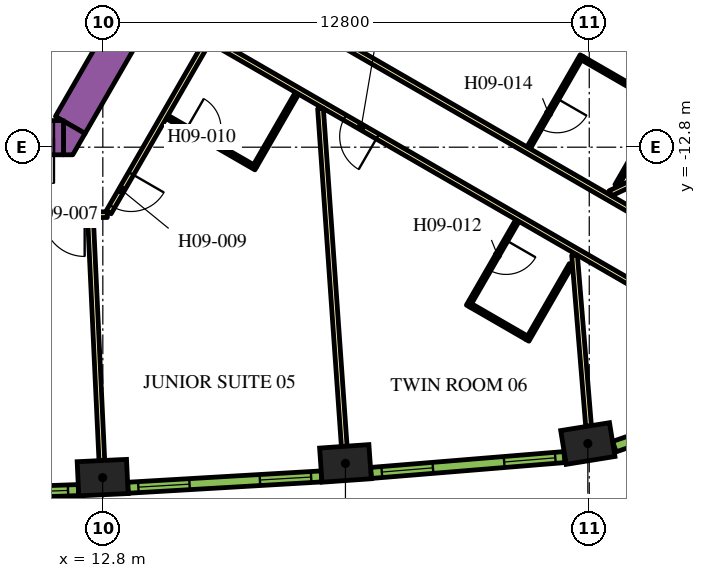
"""IFC4 building model, lengths in metres.
Left out: names, types, materials, properties, quantities, classifications, styles, units other than length and angle.
Written with IfcOpenShell. Run it as: python <this file> out.ifc"""

import sys

from ifc_helpers import new_model, si_unit, direction, frame, frame_2d, origin, origin_2d, place, context, subcontext, project, spatial, polyline, rectangle, outline, extrude, element, fill, save


model = new_model("IFC4")
c1 = context("Model", 3, precision=1e-05, world=origin(), true_north=direction((0.0, 1.0)))
c2 = subcontext(c1, "Body", "Model", "MODEL_VIEW")
j1 = project(units=[si_unit("LENGTHUNIT", "METRE"), si_unit("PLANEANGLEUNIT", "RADIAN")], contexts=[c1])
p1 = place(None, origin())
s1 = spatial("IfcSite", under=j1, at=p1, CompositionType="ELEMENT")
p2 = place(p1, origin())
s2 = spatial("IfcBuilding", under=s1, at=p2, CompositionType="ELEMENT")
p3 = place(p2, frame((0.0, 0.0, 122.7)))
s3 = spatial("IfcBuildingStorey", under=s2, at=p3, CompositionType="ELEMENT", Elevation=122.7)
for number, where, z_axis, x_axis in (
    (1, (12.795, -21.494, 0.0), (0.0, 0.0, 1.0), (0.999, 0.047, 0.0)),
    (2, (19.184, -21.12, 0.0), (0.0, 0.0, 1.0), (0.998, 0.07, 0.0)),
    (3, (25.563, -20.597, 0.0), (0.0, 0.0, 1.0), (0.987, 0.159, 0.0)),
):
    element("IfcColumn", number, at=place(p3, frame(where, z_axis=z_axis, x_axis=x_axis)), inside=s3, PredefinedType="COLUMN", context=c2, shape_type="SweptSolid", body=[
        extrude(rectangle(XDim=1.3, YDim=0.9, at=origin_2d()), origin(), (0.0, 0.0, 1.0), 3.9),
    ])
p4 = place(p3, frame((11.943, -12.214, 0.0), z_axis=(0.0, 0.0, 1.0), x_axis=(0.49998092645, 0.866036415623, 0.0)))
e4 = element("IfcWall", 4, at=p4, inside=s3, PredefinedType="SOLIDWALL", context=c2, shape_type="SweptSolid", body=[
    extrude(rectangle(XDim=8.83, YDim=0.9, at=frame_2d((4.415, 0.0))), origin(), (0.0, 0.0, 1.0), 3.9),
])
p5 = place(p3, origin())
e5 = element("IfcWall", 5, at=p5, inside=s3, PredefinedType="SOLIDWALL", context=c2, shape_type="SweptSolid", body=[
    extrude(outline(polyline([(12.009, -13.0), (11.764, -13.0), (11.764, -12.113), (12.332, -12.441), (12.009, -13.0)])), origin(), (0.0, 0.0, 1.0), 3.9),
])
p6 = place(p3, frame((11.764, -12.55, 0.0), z_axis=(0.0, 0.0, 1.0), x_axis=(-1.0, 0.0, 0.0)))
e6 = element("IfcWall", 6, at=p6, inside=s3, PredefinedType="SOLIDWALL", context=c2, shape_type="SweptSolid", body=[
    extrude(rectangle(XDim=1.7, YDim=0.9, at=frame_2d((0.85, 0.0))), origin(), (0.0, 0.0, 1.0), 3.9),
])
p7 = place(p6, frame((0.25, 0.0, 0.0)))
e7 = element("IfcOpeningElement", 7, at=p7, cuts=e6, PredefinedType="OPENING", context=c2, shape_type="SweptSolid", body=[
    extrude(rectangle(XDim=1.2, YDim=2.1, at=frame_2d((0.6, 1.05))), frame((0.0, 0.46, 0.0), z_axis=(0.0, -1.0, 0.0), x_axis=(1.0, 0.0, 0.0)), (0.0, 0.0, 1.0), 0.92),
])
p8 = place(p3, frame((16.412, -8.523, 0.0), z_axis=(0.0, 0.0, 1.0), x_axis=(0.866025629663, -0.499999608766, 0.0)))
e8 = element("IfcWall", 8, at=p8, inside=s3, PredefinedType="PARTITIONING", context=c2, shape_type="SweptSolid", body=[
    extrude(rectangle(XDim=13.624, YDim=0.15, at=frame_2d((6.812, 0.0))), origin(), (0.0, 0.0, 1.0), 2.75),
])
p9 = place(p8, frame((0.426, 0.0, 0.0)))
e9 = element("IfcOpeningElement", 9, at=p9, cuts=e8, PredefinedType="OPENING", context=c2, shape_type="SweptSolid", body=[
    extrude(rectangle(XDim=1.0, YDim=2.1, at=frame_2d((0.5, 1.05))), frame((0.0, 0.085, 0.0), z_axis=(0.0, -1.0, 0.0), x_axis=(1.0, 0.0, 0.0)), (0.0, 0.0, 1.0), 0.17),
])
p10 = place(p3, frame((12.918, -14.575, 0.0), z_axis=(0.0, 0.0, 1.0), x_axis=(-1.0, 0.0, 0.0)))
e10 = element("IfcWall", 10, at=p10, inside=s3, PredefinedType="PARTITIONING", context=c2, shape_type="SweptSolid", body=[
    extrude(rectangle(XDim=25.766, YDim=0.15, at=frame_2d((12.883, 0.0))), origin(), (0.0, 0.0, 1.0), 2.75),
])
p11 = place(p10, frame((16.189, 0.0, 0.0)))
e11 = element("IfcOpeningElement", 11, at=p11, cuts=e10, PredefinedType="OPENING", context=c2, shape_type="SweptSolid", body=[
    extrude(rectangle(XDim=1.0, YDim=2.1, at=frame_2d((0.5, 1.05))), frame((0.0, 0.085, 0.0), z_axis=(0.0, -1.0, 0.0), x_axis=(1.0, 0.0, 0.0)), (0.0, 0.0, 1.0), 0.17),
])
p12 = place(p10, frame((14.882, 0.0, 0.0)))
e12 = element("IfcOpeningElement", 12, at=p12, cuts=e10, PredefinedType="OPENING", context=c2, shape_type="SweptSolid", body=[
    extrude(rectangle(XDim=1.0, YDim=2.1, at=frame_2d((0.5, 1.05))), frame((0.0, 0.085, 0.0), z_axis=(0.0, -1.0, 0.0), x_axis=(1.0, 0.0, 0.0)), (0.0, 0.0, 1.0), 0.17),
])
p13 = place(p10, frame((0.596, 0.0, 0.0)))
e13 = element("IfcOpeningElement", 13, at=p13, cuts=e10, PredefinedType="OPENING", context=c2, shape_type="SweptSolid", body=[
    extrude(rectangle(XDim=1.1, YDim=2.1, at=frame_2d((0.55, 1.05))), frame((0.0, 0.085, 0.0), z_axis=(0.0, -1.0, 0.0), x_axis=(1.0, 0.0, 0.0)), (0.0, 0.0, 1.0), 0.17),
])
p14 = place(p3, frame((15.587, -9.952, 0.0), z_axis=(0.0, 0.0, 1.0), x_axis=(-0.500016618951, -0.866015808616, 0.0)))
e14 = element("IfcWall", 14, at=p14, inside=s3, PredefinedType="PARTITIONING", context=c2, shape_type="SweptSolid", body=[
    extrude(rectangle(XDim=5.268, YDim=0.15, at=frame_2d((2.634, 0.0))), origin(), (0.0, 0.0, 1.0), 2.75),
])
p15 = place(p14, frame((4.088, 0.0, 0.0)))
e15 = element("IfcOpeningElement", 15, at=p15, cuts=e14, PredefinedType="OPENING", context=c2, shape_type="SweptSolid", body=[
    extrude(rectangle(XDim=1.0, YDim=2.1, at=frame_2d((0.5, 1.05))), frame((0.0, 0.085, 0.0), z_axis=(0.0, -1.0, 0.0), x_axis=(1.0, 0.0, 0.0)), (0.0, 0.0, 1.0), 0.17),
])
p16 = place(p3, frame((27.386, -16.764, 0.0), z_axis=(0.0, 0.0, 1.0), x_axis=(-0.866022585856, 0.500004880763, 0.0)))
e16 = element("IfcWall", 16, at=p16, inside=s3, PredefinedType="PARTITIONING", context=c2, shape_type="SweptSolid", body=[
    extrude(rectangle(XDim=13.544, YDim=0.15, at=frame_2d((6.772, 0.0))), origin(), (0.0, 0.0, 1.0), 2.75),
])
p17 = place(p16, frame((8.491, 0.0, 0.0)))
e17 = element("IfcOpeningElement", 17, at=p17, cuts=e16, PredefinedType="OPENING", context=c2, shape_type="SweptSolid", body=[
    extrude(rectangle(XDim=1.0, YDim=2.1, at=frame_2d((0.5, 1.05))), frame((0.0, 0.085, 0.0), z_axis=(0.0, -1.0, 0.0), x_axis=(1.0, 0.0, 0.0)), (0.0, 0.0, 1.0), 0.17),
])
p18 = place(p3, frame((12.774, -21.045, 0.0), z_axis=(0.0, 0.0, 1.0), x_axis=(-0.046750341626, 0.998906605023, 0.0)))
e18 = element("IfcWall", 18, at=p18, inside=s3, PredefinedType="PARTITIONING", context=c2, shape_type="SweptSolid", body=[
    extrude(rectangle(XDim=6.392, YDim=0.15, at=frame_2d((3.196, 0.0))), origin(), (0.0, 0.0, 1.0), 2.75),
])
p19 = place(p3, frame((19.153, -20.671, 0.0), z_axis=(0.0, 0.0, 1.0), x_axis=(-0.070070736723, 0.997542025107, 0.0)))
e19 = element("IfcWall", 19, at=p19, inside=s3, PredefinedType="PARTITIONING", context=c2, shape_type="SweptSolid", body=[
    extrude(rectangle(XDim=8.909, YDim=0.15, at=frame_2d((4.455, 0.0))), origin(), (0.0, 0.0, 1.0), 2.75),
])
p20 = place(p3, frame((25.582, -20.138, 0.0), z_axis=(0.0, 0.0, 1.0), x_axis=(-0.081746132986, 0.996653184283, 0.0)))
e20 = element("IfcWall", 20, at=p20, inside=s3, PredefinedType="PARTITIONING", context=c2, shape_type="SweptSolid", body=[
    extrude(rectangle(XDim=4.51, YDim=0.15, at=frame_2d((2.255, 0.0))), origin(), (0.0, 0.0, 1.0), 2.75),
])
p21 = place(p3, frame((30.231, -12.085, 0.0), z_axis=(0.0, 0.0, 1.0), x_axis=(-0.904001132572, -0.427530060122, 0.0)))
e21 = element("IfcWall", 21, at=p21, inside=s3, PredefinedType="PARTITIONING", context=c2, shape_type="SweptSolid", body=[
    extrude(rectangle(XDim=4.51, YDim=0.15, at=frame_2d((2.255, 0.0))), origin(), (0.0, 0.0, 1.0), 2.75),
])
p22 = place(p3, frame((14.49, -12.003, 0.0), z_axis=(0.0, 0.0, 1.0), x_axis=(0.866059108428, -0.4999416173, 0.0)))
e22 = element("IfcWall", 22, at=p22, inside=s3, PredefinedType="PARTITIONING", context=c2, shape_type="SweptSolid", body=[
    extrude(rectangle(XDim=2.7, YDim=0.1, at=frame_2d((1.35, 0.0))), origin(), (0.0, 0.0, 1.0), 2.75),
])
p23 = place(p22, frame((0.6, 0.0, 0.0)))
e23 = element("IfcOpeningElement", 23, at=p23, cuts=e22, PredefinedType="OPENING", context=c2, shape_type="SweptSolid", body=[
    extrude(rectangle(XDim=0.9, YDim=2.1, at=frame_2d((0.45, 1.05))), frame((0.0, 0.06, 0.0), z_axis=(0.0, -1.0, 0.0), x_axis=(1.0, 0.0, 0.0)), (0.0, 0.0, 1.0), 0.12),
])
p24 = place(p3, frame((16.81, -13.285, 0.0), z_axis=(0.0, 0.0, 1.0), x_axis=(0.499994660107, 0.866028486751, 0.0)))
e24 = element("IfcWall", 24, at=p24, inside=s3, PredefinedType="PARTITIONING", context=c2, shape_type="SweptSolid", body=[
    extrude(rectangle(XDim=2.2, YDim=0.1, at=frame_2d((1.1, 0.0))), origin(), (0.0, 0.0, 1.0), 2.75),
])
p25 = place(p3, frame((23.71, -14.728, 0.0), z_axis=(0.0, 0.0, 1.0), x_axis=(-0.500006934395, -0.866021400173, 0.0)))
e25 = element("IfcWall", 25, at=p25, inside=s3, PredefinedType="PARTITIONING", context=c2, shape_type="SweptSolid", body=[
    extrude(rectangle(XDim=2.6, YDim=0.1, at=frame_2d((1.3, 0.0))), origin(), (0.0, 0.0, 1.0), 2.75),
])
p26 = place(p25, frame((0.6, 0.0, 0.0)))
e26 = element("IfcOpeningElement", 26, at=p26, cuts=e25, PredefinedType="OPENING", context=c2, shape_type="SweptSolid", body=[
    extrude(rectangle(XDim=0.9, YDim=2.1, at=frame_2d((0.45, 1.05))), frame((0.0, 0.06, 0.0), z_axis=(0.0, -1.0, 0.0), x_axis=(1.0, 0.0, 0.0)), (0.0, 0.0, 1.0), 0.12),
])
p27 = place(p3, frame((22.479, -16.962, 0.0), z_axis=(0.0, 0.0, 1.0), x_axis=(0.86605165483, -0.499954529098, 0.0)))
e27 = element("IfcWall", 27, at=p27, inside=s3, PredefinedType="PARTITIONING", context=c2, shape_type="SweptSolid", body=[
    extrude(rectangle(XDim=1.7, YDim=0.1, at=frame_2d((0.85, 0.0))), origin(), (0.0, 0.0, 1.0), 2.75),
])
p28 = place(p3, frame((25.119, -15.888, 0.0), z_axis=(0.0, 0.0, 1.0), x_axis=(-0.499998129301, -0.86602648383, 0.0)))
e28 = element("IfcWall", 28, at=p28, inside=s3, PredefinedType="PARTITIONING", context=c2, shape_type="SweptSolid", body=[
    extrude(rectangle(XDim=2.3, YDim=0.1, at=frame_2d((1.15, 0.0))), origin(), (0.0, 0.0, 1.0), 2.75),
])
p29 = place(p3, frame((25.404, -10.395, 0.0), z_axis=(0.0, 0.0, 1.0), x_axis=(-0.49998411664, -0.866034573852, 0.0)))
e29 = element("IfcWall", 29, at=p29, inside=s3, PredefinedType="PARTITIONING", context=c2, shape_type="SweptSolid", body=[
    extrude(rectangle(XDim=2.8, YDim=0.1, at=frame_2d((1.4, 0.0))), origin(), (0.0, 0.0, 1.0), 2.75),
])
p30 = place(p29, frame((1.3, 0.0, 0.0)))
e30 = element("IfcOpeningElement", 30, at=p30, cuts=e29, PredefinedType="OPENING", context=c2, shape_type="SweptSolid", body=[
    extrude(rectangle(XDim=0.9, YDim=2.1, at=frame_2d((0.45, 1.05))), frame((0.0, 0.06, 0.0), z_axis=(0.0, -1.0, 0.0), x_axis=(1.0, 0.0, 0.0)), (0.0, 0.0, 1.0), 0.12),
])
p31 = place(p3, frame((25.422, -10.463, 0.0), z_axis=(0.0, 0.0, 1.0), x_axis=(0.866024647952, -0.500001309137, 0.0)))
e31 = element("IfcWall", 31, at=p31, inside=s3, PredefinedType="PARTITIONING", context=c2, shape_type="SweptSolid", body=[
    extrude(rectangle(XDim=2.4, YDim=0.1, at=frame_2d((1.2, 0.0))), origin(), (0.0, 0.0, 1.0), 2.75),
])
p32 = place(p3, frame((26.319, -13.81, 0.0), z_axis=(0.0, 0.0, 1.0), x_axis=(0.500004234368, 0.866022959057, 0.0)))
e32 = element("IfcWall", 32, at=p32, inside=s3, PredefinedType="PARTITIONING", context=c2, shape_type="SweptSolid", body=[
    extrude(rectangle(XDim=2.5, YDim=0.1, at=frame_2d((1.25, 0.0))), origin(), (0.0, 0.0, 1.0), 2.75),
])
p33 = place(p3, frame((7.059, -22.001, 0.0), z_axis=(0.0, 0.0, 1.0), x_axis=(0.999385993957, 0.035037623812, 0.0)))
e33 = element("IfcWall", 33, at=p33, inside=s3, PredefinedType="SOLIDWALL", context=c2, shape_type="SweptSolid", body=[
    extrude(rectangle(XDim=5.101, YDim=0.29, at=frame_2d((2.55, 0.0))), origin(), (0.0, 0.0, 1.0), 3.65),
])
p34 = place(p33, frame((0.273, 0.0, 0.9)))
e34 = element("IfcOpeningElement", 34, at=p34, cuts=e33, PredefinedType="OPENING", context=c2, shape_type="SweptSolid", body=[
    extrude(rectangle(XDim=1.35, YDim=2.15, at=frame_2d((0.675, 1.075))), frame((0.0, 0.155, 0.0), z_axis=(0.0, -1.0, 0.0), x_axis=(1.0, 0.0, 0.0)), (0.0, 0.0, 1.0), 0.31),
])
p35 = place(p33, frame((3.478, 0.0, 0.9)))
e35 = element("IfcOpeningElement", 35, at=p35, cuts=e33, PredefinedType="OPENING", context=c2, shape_type="SweptSolid", body=[
    extrude(rectangle(XDim=1.35, YDim=2.15, at=frame_2d((0.675, 1.075))), frame((0.0, 0.155, 0.0), z_axis=(0.0, -1.0, 0.0), x_axis=(1.0, 0.0, 0.0)), (0.0, 0.0, 1.0), 0.31),
])
p36 = place(p3, frame((13.462, -21.761, 0.0), z_axis=(0.0, 0.0, 1.0), x_axis=(0.998290511436, 0.058447025388, 0.0)))
e36 = element("IfcWall", 36, at=p36, inside=s3, PredefinedType="SOLIDWALL", context=c2, shape_type="SweptSolid", body=[
    extrude(rectangle(XDim=5.1, YDim=0.29, at=frame_2d((2.55, 0.0))), origin(), (0.0, 0.0, 1.0), 3.65),
])
p37 = place(p36, frame((0.272, 0.0, 0.9)))
e37 = element("IfcOpeningElement", 37, at=p37, cuts=e36, PredefinedType="OPENING", context=c2, shape_type="SweptSolid", body=[
    extrude(rectangle(XDim=1.35, YDim=2.15, at=frame_2d((0.675, 1.075))), frame((0.0, 0.155, 0.0), z_axis=(0.0, -1.0, 0.0), x_axis=(1.0, 0.0, 0.0)), (0.0, 0.0, 1.0), 0.31),
])
p38 = place(p36, frame((3.478, 0.0, 0.9)))
e38 = element("IfcOpeningElement", 38, at=p38, cuts=e36, PredefinedType="OPENING", context=c2, shape_type="SweptSolid", body=[
    extrude(rectangle(XDim=1.35, YDim=2.15, at=frame_2d((0.675, 1.075))), frame((0.0, 0.155, 0.0), z_axis=(0.0, -1.0, 0.0), x_axis=(1.0, 0.0, 0.0)), (0.0, 0.0, 1.0), 0.31),
])
p39 = place(p3, frame((19.857, -21.371, 0.0), z_axis=(0.0, 0.0, 1.0), x_axis=(0.99665273362, 0.081751627308, 0.0)))
e39 = element("IfcWall", 39, at=p39, inside=s3, PredefinedType="SOLIDWALL", context=c2, shape_type="SweptSolid", body=[
    extrude(rectangle(XDim=5.107, YDim=0.29, at=frame_2d((2.553, 0.0))), origin(), (0.0, 0.0, 1.0), 3.65),
])
p40 = place(p39, frame((0.285, 0.0, 0.9)))
e40 = element("IfcOpeningElement", 40, at=p40, cuts=e39, PredefinedType="OPENING", context=c2, shape_type="SweptSolid", body=[
    extrude(rectangle(XDim=1.35, YDim=2.15, at=frame_2d((0.675, 1.075))), frame((0.0, 0.155, 0.0), z_axis=(0.0, -1.0, 0.0), x_axis=(1.0, 0.0, 0.0)), (0.0, 0.0, 1.0), 0.31),
])
p41 = place(p39, frame((3.516, 0.0, 0.9)))
e41 = element("IfcOpeningElement", 41, at=p41, cuts=e39, PredefinedType="OPENING", context=c2, shape_type="SweptSolid", body=[
    extrude(rectangle(XDim=1.35, YDim=2.15, at=frame_2d((0.675, 1.075))), frame((0.0, 0.155, 0.0), z_axis=(0.0, -1.0, 0.0), x_axis=(1.0, 0.0, 0.0)), (0.0, 0.0, 1.0), 0.31),
])
p42 = place(p3, frame((26.261, -20.679, 0.0), z_axis=(0.0, 0.0, 1.0), x_axis=(0.945385815453, 0.325953462844, 0.0)))
e42 = element("IfcWall", 42, at=p42, inside=s3, PredefinedType="SOLIDWALL", context=c2, shape_type="SweptSolid", body=[
    extrude(rectangle(XDim=1.819, YDim=0.29, at=frame_2d((0.91, 0.0))), origin(), (0.0, 0.0, 1.0), 3.65),
])
p43 = place(p42, frame((0.46, 0.0, 0.9)))
e43 = element("IfcOpeningElement", 43, at=p43, cuts=e42, PredefinedType="OPENING", context=c2, shape_type="SweptSolid", body=[
    extrude(rectangle(XDim=0.9, YDim=2.15, at=frame_2d((0.45, 1.075))), frame((0.0, 0.155, 0.0), z_axis=(0.0, -1.0, 0.0), x_axis=(1.0, 0.0, 0.0)), (0.0, 0.0, 1.0), 0.31),
])
p44 = place(p7, origin())
e44 = element("IfcDoor", 44, at=p44, inside=s3, OperationType="SINGLE_SWING_LEFT", PredefinedType="DOOR", context=c2, shape_type="SweptSolid", body=[
    extrude(rectangle(XDim=1.2, YDim=2.1, at=frame_2d((0.6, 1.05))), frame((0.0, 0.025, 0.0), z_axis=(0.0, -1.0, 0.0), x_axis=(1.0, 0.0, 0.0)), (0.0, 0.0, 1.0), 0.05),
])
fill(e7, e44)
p45 = place(p13, origin())
e45 = element("IfcDoor", 45, at=p45, inside=s3, OperationType="SINGLE_SWING_LEFT", PredefinedType="DOOR", context=c2, shape_type="SweptSolid", body=[
    extrude(rectangle(XDim=1.1, YDim=2.1, at=frame_2d((0.55, 1.05))), frame((0.0, 0.025, 0.0), z_axis=(0.0, -1.0, 0.0), x_axis=(1.0, 0.0, 0.0)), (0.0, 0.0, 1.0), 0.05),
])
fill(e13, e45)
p46 = place(p15, origin())
e46 = element("IfcDoor", 46, at=p46, inside=s3, OperationType="SINGLE_SWING_RIGHT", PredefinedType="DOOR", context=c2, shape_type="SweptSolid", body=[
    extrude(rectangle(XDim=1.0, YDim=2.1, at=frame_2d((0.5, 1.05))), frame((0.0, 0.025, 0.0), z_axis=(0.0, -1.0, 0.0), x_axis=(1.0, 0.0, 0.0)), (0.0, 0.0, 1.0), 0.05),
])
fill(e15, e46)
p47 = place(p23, origin())
e47 = element("IfcDoor", 47, at=p47, inside=s3, OperationType="SINGLE_SWING_LEFT", PredefinedType="DOOR", context=c2, shape_type="SweptSolid", body=[
    extrude(rectangle(XDim=0.9, YDim=2.1, at=frame_2d((0.45, 1.05))), frame((0.0, 0.025, 0.0), z_axis=(0.0, -1.0, 0.0), x_axis=(1.0, 0.0, 0.0)), (0.0, 0.0, 1.0), 0.05),
])
fill(e23, e47)
p48 = place(p17, origin())
e48 = element("IfcDoor", 48, at=p48, inside=s3, OperationType="SINGLE_SWING_RIGHT", PredefinedType="DOOR", context=c2, shape_type="SweptSolid", body=[
    extrude(rectangle(XDim=1.0, YDim=2.1, at=frame_2d((0.5, 1.05))), frame((0.0, 0.025, 0.0), z_axis=(0.0, -1.0, 0.0), x_axis=(1.0, 0.0, 0.0)), (0.0, 0.0, 1.0), 0.05),
])
fill(e17, e48)
p49 = place(p26, origin())
e49 = element("IfcDoor", 49, at=p49, inside=s3, OperationType="SINGLE_SWING_RIGHT", PredefinedType="DOOR", context=c2, shape_type="SweptSolid", body=[
    extrude(rectangle(XDim=0.9, YDim=2.1, at=frame_2d((0.45, 1.05))), frame((0.0, 0.025, 0.0), z_axis=(0.0, -1.0, 0.0), x_axis=(1.0, 0.0, 0.0)), (0.0, 0.0, 1.0), 0.05),
])
fill(e26, e49)
p50 = place(p30, origin())
e50 = element("IfcDoor", 50, at=p50, inside=s3, OperationType="SINGLE_SWING_LEFT", PredefinedType="DOOR", context=c2, shape_type="SweptSolid", body=[
    extrude(rectangle(XDim=0.9, YDim=2.1, at=frame_2d((0.45, 1.05))), frame((0.0, 0.025, 0.0), z_axis=(0.0, -1.0, 0.0), x_axis=(1.0, 0.0, 0.0)), (0.0, 0.0, 1.0), 0.05),
])
fill(e30, e50)
p51 = place(p35, origin())
e51 = element("IfcWindow", 51, at=p51, inside=s3, PartitioningType="DOUBLE_PANEL_VERTICAL", PredefinedType="WINDOW", context=c2, shape_type="SweptSolid", body=[
    extrude(rectangle(XDim=1.35, YDim=2.15, at=frame_2d((0.675, 1.075))), frame((0.0, 0.015, 0.0), z_axis=(0.0, -1.0, 0.0), x_axis=(1.0, 0.0, 0.0)), (0.0, 0.0, 1.0), 0.06),
])
fill(e35, e51)
p52 = place(p37, origin())
e52 = element("IfcWindow", 52, at=p52, inside=s3, PartitioningType="DOUBLE_PANEL_VERTICAL", PredefinedType="WINDOW", context=c2, shape_type="SweptSolid", body=[
    extrude(rectangle(XDim=1.35, YDim=2.15, at=frame_2d((0.675, 1.075))), frame((0.0, 0.015, 0.0), z_axis=(0.0, -1.0, 0.0), x_axis=(1.0, 0.0, 0.0)), (0.0, 0.0, 1.0), 0.06),
])
fill(e37, e52)
p53 = place(p38, origin())
e53 = element("IfcWindow", 53, at=p53, inside=s3, PartitioningType="DOUBLE_PANEL_VERTICAL", PredefinedType="WINDOW", context=c2, shape_type="SweptSolid", body=[
    extrude(rectangle(XDim=1.35, YDim=2.15, at=frame_2d((0.675, 1.075))), frame((0.0, 0.015, 0.0), z_axis=(0.0, -1.0, 0.0), x_axis=(1.0, 0.0, 0.0)), (0.0, 0.0, 1.0), 0.06),
])
fill(e38, e53)
p54 = place(p40, origin())
e54 = element("IfcWindow", 54, at=p54, inside=s3, PartitioningType="DOUBLE_PANEL_VERTICAL", PredefinedType="WINDOW", context=c2, shape_type="SweptSolid", body=[
    extrude(rectangle(XDim=1.35, YDim=2.15, at=frame_2d((0.675, 1.075))), frame((0.0, 0.015, 0.0), z_axis=(0.0, -1.0, 0.0), x_axis=(1.0, 0.0, 0.0)), (0.0, 0.0, 1.0), 0.06),
])
fill(e40, e54)
p55 = place(p41, origin())
e55 = element("IfcWindow", 55, at=p55, inside=s3, PartitioningType="DOUBLE_PANEL_VERTICAL", PredefinedType="WINDOW", context=c2, shape_type="SweptSolid", body=[
    extrude(rectangle(XDim=1.35, YDim=2.15, at=frame_2d((0.675, 1.075))), frame((0.0, 0.015, 0.0), z_axis=(0.0, -1.0, 0.0), x_axis=(1.0, 0.0, 0.0)), (0.0, 0.0, 1.0), 0.06),
])
fill(e41, e55)
save(model, sys.argv[1])
